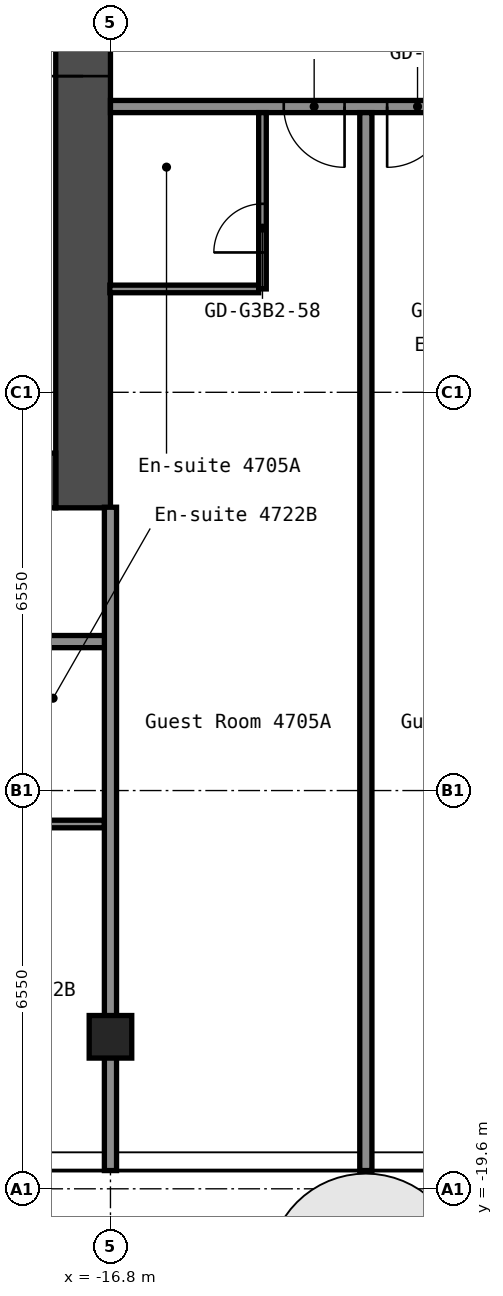
"""IFC4 building model, lengths in metres.
Left out: names, types, materials, properties, quantities, classifications, styles, units other than length and angle.
Written with IfcOpenShell. Run it as: python <this file> out.ifc"""

import sys

from ifc_helpers import new_model, si_unit, direction, frame, frame_2d, origin, origin_2d, place, context, subcontext, project, spatial, rectangle, hollow_rectangle, extrude, element, fill, save


model = new_model("IFC4")
c1 = context("Model", 3, precision=1e-05, world=origin(), true_north=direction((0.0, 1.0)))
c2 = subcontext(c1, "Body", "Model", "MODEL_VIEW")
j1 = project(units=[si_unit("LENGTHUNIT", "METRE"), si_unit("PLANEANGLEUNIT", "RADIAN")], contexts=[c1])
p1 = place(None, origin())
s1 = spatial("IfcSite", under=j1, at=p1, CompositionType="ELEMENT")
p2 = place(p1, origin())
s2 = spatial("IfcBuilding", under=s1, at=p2, CompositionType="ELEMENT")
p3 = place(p2, frame((0.0, 0.0, 166.2)))
s3 = spatial("IfcBuildingStorey", under=s2, at=p3, CompositionType="ELEMENT", Elevation=166.2)
p4 = place(p3, frame((-16.8, -17.1, 0.0), z_axis=(0.0, 0.0, 1.0), x_axis=(1.0, 0.0, 0.0)))
e1 = element("IfcColumn", 1, at=p4, inside=s3, PredefinedType="COLUMN", context=c2, shape_type="SweptSolid", body=[
    extrude(hollow_rectangle(XDim=0.7, YDim=0.7, WallThickness=0.028, at=origin_2d()), origin(), (0.0, 0.0, 1.0), 2.75),
])
p5 = place(p3, frame((-17.25, -8.4, 0.0), z_axis=(0.0, 0.0, 1.0), x_axis=(0.0, 1.0, 0.0)))
e2 = element("IfcWall", 2, at=p5, inside=s3, PredefinedType="SHEAR", context=c2, shape_type="SweptSolid", body=[
    extrude(rectangle(XDim=16.8, YDim=0.9, at=frame_2d((8.4, 0.0))), origin(), (0.0, 0.0, 1.0), 2.75),
])
p6 = place(p5, frame((7.1, 0.0, 0.0)))
e3 = element("IfcOpeningElement", 3, at=p6, cuts=e2, PredefinedType="OPENING", context=c2, shape_type="SweptSolid", body=[
    extrude(rectangle(XDim=1.6, YDim=2.1, at=frame_2d((0.8, 1.05))), frame((0.0, 0.46, 0.0), z_axis=(0.0, -1.0, 0.0), x_axis=(1.0, 0.0, 0.0)), (0.0, 0.0, 1.0), 0.92),
])
p7 = place(p3, frame((-32.7, -7.95, 0.0), z_axis=(0.0, 0.0, 1.0), x_axis=(1.0, 0.0, 0.0)))
e4 = element("IfcWall", 4, at=p7, inside=s3, PredefinedType="SHEAR", context=c2, shape_type="SweptSolid", body=[
    extrude(rectangle(XDim=15.0, YDim=0.9, at=frame_2d((7.5, 0.0))), origin(), (0.0, 0.0, 1.0), 2.75),
])
p8 = place(p7, frame((11.45, 0.0, 0.0)))
e5 = element("IfcOpeningElement", 5, at=p8, cuts=e4, PredefinedType="OPENING", context=c2, shape_type="SweptSolid", body=[
    extrude(rectangle(XDim=1.0, YDim=2.1, at=frame_2d((0.5, 1.05))), frame((0.0, 0.46, 0.0), z_axis=(0.0, -1.0, 0.0), x_axis=(1.0, 0.0, 0.0)), (0.0, 0.0, 1.0), 0.92),
])
p9 = place(p3, frame((-19.238, -13.6, 0.0), z_axis=(0.0, 0.0, 1.0), x_axis=(1.0, 0.0, 0.0)))
e6 = element("IfcWall", 6, at=p9, inside=s3, PredefinedType="PARTITIONING", context=c2, shape_type="SweptSolid", body=[
    extrude(rectangle(XDim=2.338, YDim=0.125, at=frame_2d((1.169, 0.0))), origin(), (0.0, 0.0, 1.0), 2.75),
])
p10 = place(p3, frame((-42.7, -10.6, 0.0), z_axis=(0.0, 0.0, 1.0), x_axis=(1.0, 0.0, 0.0)))
e7 = element("IfcWall", 7, at=p10, inside=s3, PredefinedType="PARTITIONING", context=c2, shape_type="SweptSolid", body=[
    extrude(rectangle(XDim=25.9, YDim=0.2, at=frame_2d((12.95, 0.0))), origin(), (0.0, 0.0, 1.0), 2.75),
])
p11 = place(p10, frame((3.25, 0.0, 0.0)))
e8 = element("IfcOpeningElement", 8, at=p11, cuts=e7, PredefinedType="OPENING", context=c2, shape_type="SweptSolid", body=[
    extrude(rectangle(XDim=1.0, YDim=2.1, at=frame_2d((0.5, 1.05))), frame((0.0, 0.11, 0.0), z_axis=(0.0, -1.0, 0.0), x_axis=(1.0, 0.0, 0.0)), (0.0, 0.0, 1.0), 0.22),
])
p12 = place(p10, frame((5.15, 0.0, 0.0)))
e9 = element("IfcOpeningElement", 9, at=p12, cuts=e7, PredefinedType="OPENING", context=c2, shape_type="SweptSolid", body=[
    extrude(rectangle(XDim=1.0, YDim=2.1, at=frame_2d((0.5, 1.05))), frame((0.0, 0.11, 0.0), z_axis=(0.0, -1.0, 0.0), x_axis=(1.0, 0.0, 0.0)), (0.0, 0.0, 1.0), 0.22),
])
p13 = place(p10, frame((11.95, 0.0, 0.0)))
e10 = element("IfcOpeningElement", 10, at=p13, cuts=e7, PredefinedType="OPENING", context=c2, shape_type="SweptSolid", body=[
    extrude(rectangle(XDim=1.0, YDim=2.1, at=frame_2d((0.5, 1.05))), frame((0.0, 0.11, 0.0), z_axis=(0.0, -1.0, 0.0), x_axis=(1.0, 0.0, 0.0)), (0.0, 0.0, 1.0), 0.22),
])
p14 = place(p10, frame((13.65, 0.0, 0.0)))
e11 = element("IfcOpeningElement", 11, at=p14, cuts=e7, PredefinedType="OPENING", context=c2, shape_type="SweptSolid", body=[
    extrude(rectangle(XDim=1.0, YDim=2.1, at=frame_2d((0.5, 1.05))), frame((0.0, 0.11, 0.0), z_axis=(0.0, -1.0, 0.0), x_axis=(1.0, 0.0, 0.0)), (0.0, 0.0, 1.0), 0.22),
])
p15 = place(p10, frame((20.35, 0.0, 0.0)))
e12 = element("IfcOpeningElement", 12, at=p15, cuts=e7, PredefinedType="OPENING", context=c2, shape_type="SweptSolid", body=[
    extrude(rectangle(XDim=1.0, YDim=2.1, at=frame_2d((0.5, 1.05))), frame((0.0, 0.11, 0.0), z_axis=(0.0, -1.0, 0.0), x_axis=(1.0, 0.0, 0.0)), (0.0, 0.0, 1.0), 0.22),
])
p16 = place(p10, frame((22.05, 0.0, 0.0)))
e13 = element("IfcOpeningElement", 13, at=p16, cuts=e7, PredefinedType="OPENING", context=c2, shape_type="SweptSolid", body=[
    extrude(rectangle(XDim=1.0, YDim=2.1, at=frame_2d((0.5, 1.05))), frame((0.0, 0.11, 0.0), z_axis=(0.0, -1.0, 0.0), x_axis=(1.0, 0.0, 0.0)), (0.0, 0.0, 1.0), 0.22),
])
p17 = place(p3, frame((-16.81, -4.8, 0.0), z_axis=(0.0, 0.0, 1.0), x_axis=(1.0, 0.0, 0.0)))
e14 = element("IfcWall", 14, at=p17, inside=s3, PredefinedType="PARTITIONING", context=c2, shape_type="SweptSolid", body=[
    extrude(rectangle(XDim=2.448, YDim=0.125, at=frame_2d((1.224, 0.0))), origin(), (0.0, 0.0, 1.0), 2.75),
])
p18 = place(p3, frame((-16.8, -1.8, 0.0), z_axis=(0.0, 0.0, 1.0), x_axis=(1.0, 0.0, 0.0)))
e15 = element("IfcWall", 15, at=p18, inside=s3, PredefinedType="PARTITIONING", context=c2, shape_type="SweptSolid", body=[
    extrude(rectangle(XDim=33.6, YDim=0.2, at=frame_2d((16.8, 0.0))), origin(), (0.0, 0.0, 1.0), 2.75),
])
p19 = place(p18, frame((2.85, 0.0, 0.0)))
e16 = element("IfcOpeningElement", 16, at=p19, cuts=e15, PredefinedType="OPENING", context=c2, shape_type="SweptSolid", body=[
    extrude(rectangle(XDim=1.0, YDim=2.1, at=frame_2d((0.5, 1.05))), frame((0.0, 0.11, 0.0), z_axis=(0.0, -1.0, 0.0), x_axis=(1.0, 0.0, 0.0)), (0.0, 0.0, 1.0), 0.22),
])
p20 = place(p18, frame((4.55, 0.0, 0.0)))
e17 = element("IfcOpeningElement", 17, at=p20, cuts=e15, PredefinedType="OPENING", context=c2, shape_type="SweptSolid", body=[
    extrude(rectangle(XDim=1.0, YDim=2.1, at=frame_2d((0.5, 1.05))), frame((0.0, 0.11, 0.0), z_axis=(0.0, -1.0, 0.0), x_axis=(1.0, 0.0, 0.0)), (0.0, 0.0, 1.0), 0.22),
])
p21 = place(p18, frame((11.25, 0.0, 0.0)))
e18 = element("IfcOpeningElement", 18, at=p21, cuts=e15, PredefinedType="OPENING", context=c2, shape_type="SweptSolid", body=[
    extrude(rectangle(XDim=1.0, YDim=2.1, at=frame_2d((0.5, 1.05))), frame((0.0, 0.11, 0.0), z_axis=(0.0, -1.0, 0.0), x_axis=(1.0, 0.0, 0.0)), (0.0, 0.0, 1.0), 0.22),
])
p22 = place(p18, frame((12.95, 0.0, 0.0)))
e19 = element("IfcOpeningElement", 19, at=p22, cuts=e15, PredefinedType="OPENING", context=c2, shape_type="SweptSolid", body=[
    extrude(rectangle(XDim=1.0, YDim=2.1, at=frame_2d((0.5, 1.05))), frame((0.0, 0.11, 0.0), z_axis=(0.0, -1.0, 0.0), x_axis=(1.0, 0.0, 0.0)), (0.0, 0.0, 1.0), 0.22),
])
p23 = place(p18, frame((17.86, 0.0, 0.0)))
e20 = element("IfcOpeningElement", 20, at=p23, cuts=e15, PredefinedType="OPENING", context=c2, shape_type="SweptSolid", body=[
    extrude(rectangle(XDim=0.9, YDim=2.1, at=frame_2d((0.45, 1.05))), frame((0.0, 0.11, 0.0), z_axis=(0.0, -1.0, 0.0), x_axis=(1.0, 0.0, 0.0)), (0.0, 0.0, 1.0), 0.22),
])
p24 = place(p18, frame((22.06, 0.0, 0.0)))
e21 = element("IfcOpeningElement", 21, at=p24, cuts=e15, PredefinedType="OPENING", context=c2, shape_type="SweptSolid", body=[
    extrude(rectangle(XDim=0.9, YDim=2.1, at=frame_2d((0.45, 1.05))), frame((0.0, 0.11, 0.0), z_axis=(0.0, -1.0, 0.0), x_axis=(1.0, 0.0, 0.0)), (0.0, 0.0, 1.0), 0.22),
])
p25 = place(p18, frame((28.05, 0.0, 0.0)))
e22 = element("IfcOpeningElement", 22, at=p25, cuts=e15, PredefinedType="OPENING", context=c2, shape_type="SweptSolid", body=[
    extrude(rectangle(XDim=1.0, YDim=2.1, at=frame_2d((0.5, 1.05))), frame((0.0, 0.11, 0.0), z_axis=(0.0, -1.0, 0.0), x_axis=(1.0, 0.0, 0.0)), (0.0, 0.0, 1.0), 0.22),
])
p26 = place(p18, frame((29.75, 0.0, 0.0)))
e23 = element("IfcOpeningElement", 23, at=p26, cuts=e15, PredefinedType="OPENING", context=c2, shape_type="SweptSolid", body=[
    extrude(rectangle(XDim=1.0, YDim=2.1, at=frame_2d((0.5, 1.05))), frame((0.0, 0.11, 0.0), z_axis=(0.0, -1.0, 0.0), x_axis=(1.0, 0.0, 0.0)), (0.0, 0.0, 1.0), 0.22),
])
p27 = place(p3, frame((-16.8, -19.3, 0.0), z_axis=(0.0, 0.0, 1.0), x_axis=(0.0, 1.0, 0.0)))
e24 = element("IfcWall", 24, at=p27, inside=s3, PredefinedType="PARTITIONING", context=c2, shape_type="SweptSolid", body=[
    extrude(rectangle(XDim=10.91, YDim=0.2, at=frame_2d((5.455, 0.0))), origin(), (0.0, 0.0, 1.0), 2.75),
])
p28 = place(p3, frame((-14.3, -4.8, 0.0), z_axis=(0.0, 0.0, 1.0), x_axis=(0.0, 1.0, 0.0)))
e25 = element("IfcWall", 25, at=p28, inside=s3, PredefinedType="PARTITIONING", context=c2, shape_type="SweptSolid", body=[
    extrude(rectangle(XDim=2.9, YDim=0.125, at=frame_2d((1.45, 0.0))), origin(), (0.0, 0.0, 1.0), 2.75),
])
p29 = place(p28, frame((0.6, 0.0, 0.0)))
e26 = element("IfcOpeningElement", 26, at=p29, cuts=e25, PredefinedType="OPENING", context=c2, shape_type="SweptSolid", body=[
    extrude(rectangle(XDim=0.8, YDim=2.1, at=frame_2d((0.4, 1.05))), frame((0.0, 0.073, 0.0), z_axis=(0.0, -1.0, 0.0), x_axis=(1.0, 0.0, 0.0)), (0.0, 0.0, 1.0), 0.145),
])
p30 = place(p3, frame((-12.6, -19.3, 0.0), z_axis=(0.0, 0.0, 1.0), x_axis=(0.0, 1.0, 0.0)))
e27 = element("IfcWall", 27, at=p30, inside=s3, PredefinedType="PARTITIONING", context=c2, shape_type="SweptSolid", body=[
    extrude(rectangle(XDim=17.4, YDim=0.2, at=frame_2d((8.7, 0.0))), origin(), (0.0, 0.0, 1.0), 2.75),
])
p31 = place(p6, origin())
e28 = element("IfcDoor", 28, at=p31, inside=s3, OperationType="DOUBLE_DOOR_SINGLE_SWING", PredefinedType="DOOR", context=c2, shape_type="SweptSolid", body=[
    extrude(rectangle(XDim=1.6, YDim=2.1, at=frame_2d((0.8, 1.05))), frame((0.0, 0.025, 0.0), z_axis=(0.0, -1.0, 0.0), x_axis=(1.0, 0.0, 0.0)), (0.0, 0.0, 1.0), 0.05),
])
fill(e3, e28)
p32 = place(p19, origin())
e29 = element("IfcDoor", 29, at=p32, inside=s3, OperationType="SINGLE_SWING_RIGHT", PredefinedType="DOOR", context=c2, shape_type="SweptSolid", body=[
    extrude(rectangle(XDim=1.0, YDim=2.1, at=frame_2d((0.5, 1.05))), frame((0.0, 0.025, 0.0), z_axis=(0.0, -1.0, 0.0), x_axis=(1.0, 0.0, 0.0)), (0.0, 0.0, 1.0), 0.05),
])
fill(e16, e29)
p33 = place(p20, origin())
e30 = element("IfcDoor", 30, at=p33, inside=s3, OperationType="SINGLE_SWING_LEFT", PredefinedType="DOOR", context=c2, shape_type="SweptSolid", body=[
    extrude(rectangle(XDim=1.0, YDim=2.1, at=frame_2d((0.5, 1.05))), frame((0.0, 0.025, 0.0), z_axis=(0.0, -1.0, 0.0), x_axis=(1.0, 0.0, 0.0)), (0.0, 0.0, 1.0), 0.05),
])
fill(e17, e30)
p34 = place(p29, origin())
e31 = element("IfcDoor", 31, at=p34, inside=s3, OperationType="SINGLE_SWING_RIGHT", PredefinedType="DOOR", context=c2, shape_type="SweptSolid", body=[
    extrude(rectangle(XDim=0.8, YDim=2.1, at=frame_2d((0.4, 1.05))), frame((0.0, 0.025, 0.0), z_axis=(0.0, -1.0, 0.0), x_axis=(1.0, 0.0, 0.0)), (0.0, 0.0, 1.0), 0.05),
])
fill(e26, e31)
save(model, sys.argv[1])
